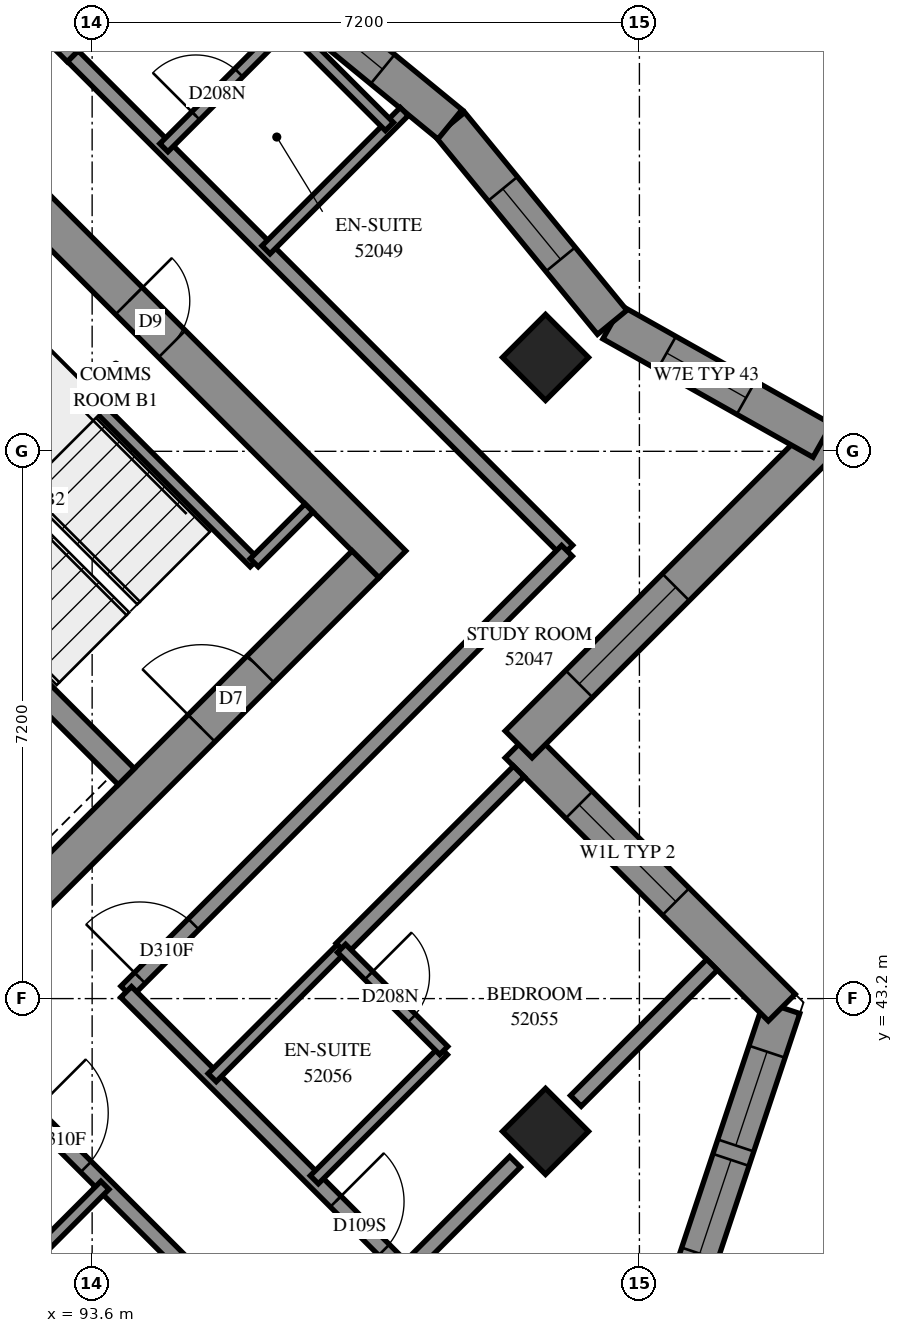
"""IFC4 building model, lengths in metres.
Left out: names, types, materials, properties, quantities, classifications, styles, units other than length and angle.
Written with IfcOpenShell. Run it as: python <this file> out.ifc"""

import sys

from ifc_helpers import new_model, si_unit, direction, frame, frame_2d, origin, origin_2d, place, context, subcontext, project, spatial, polyline, rectangle, outline, extrude, element, fill, save


model = new_model("IFC4")
c1 = context("Model", 3, precision=1e-05, world=origin(), true_north=direction((0.0, 1.0)))
c2 = subcontext(c1, "Body", "Model", "MODEL_VIEW")
j1 = project(units=[si_unit("LENGTHUNIT", "METRE"), si_unit("PLANEANGLEUNIT", "RADIAN")], contexts=[c1])
p1 = place(None, origin())
s1 = spatial("IfcSite", under=j1, at=p1, CompositionType="ELEMENT")
p2 = place(p1, origin())
s2 = spatial("IfcBuilding", under=s1, at=p2, CompositionType="ELEMENT")
p3 = place(p2, frame((0.0, 0.0, 193.0)))
s3 = spatial("IfcBuildingStorey", under=s2, at=p3, CompositionType="ELEMENT", Elevation=193.0)
for number, where, z_axis, x_axis in (
    (1, (99.565, 51.635, 0.0), (0.0, 0.0, 1.0), (0.707, -0.707, 0.0)),
    (2, (99.565, 41.453, 0.0), (0.0, 0.0, 1.0), (0.707, -0.707, 0.0)),
):
    element("IfcColumn", number, at=place(p3, frame(where, z_axis=z_axis, x_axis=x_axis)), inside=s3, PredefinedType="COLUMN", context=c2, shape_type="SweptSolid", body=[
        extrude(rectangle(XDim=0.8, YDim=0.8, at=origin_2d()), origin(), (0.0, 0.0, 1.0), 3.1),
    ])
p4 = place(p3, frame((86.66, 59.802, -0.3), z_axis=(0.0, 0.0, 1.0), x_axis=(0.7071067812, -0.7071067812, 0.0)))
e3 = element("IfcWall", 3, at=p4, inside=s3, PredefinedType="SHEAR", context=c2, shape_type="SweptSolid", body=[
    extrude(rectangle(XDim=15.4, YDim=0.5, at=frame_2d((7.7, 0.0))), origin(), (0.0, 0.0, 1.0), 2.7),
])
p5 = place(p4, frame((10.5, 0.0, 0.3)))
e4 = element("IfcOpeningElement", 4, at=p5, cuts=e3, PredefinedType="OPENING", context=c2, shape_type="SweptSolid", body=[
    extrude(rectangle(XDim=0.8, YDim=2.1, at=frame_2d((0.4, 1.05))), frame((0.0, 0.26, 0.0), z_axis=(0.0, -1.0, 0.0), x_axis=(1.0, 0.0, 0.0)), (0.0, 0.0, 1.0), 0.52),
])
p6 = place(p3, frame((87.013, 38.731, -0.3), z_axis=(0.0, 0.0, 1.0), x_axis=(0.7071067812, 0.7071067812, 0.0)))
e5 = element("IfcWall", 5, at=p6, inside=s3, PredefinedType="SHEAR", context=c2, shape_type="SweptSolid", body=[
    extrude(rectangle(XDim=14.4, YDim=0.5, at=frame_2d((7.2, 0.0))), origin(), (0.0, 0.0, 1.0), 2.7),
])
p7 = place(p6, frame((4.55, 0.0, 0.3)))
e6 = element("IfcOpeningElement", 6, at=p7, cuts=e5, PredefinedType="OPENING", context=c2, shape_type="SweptSolid", body=[
    extrude(rectangle(XDim=1.1, YDim=2.1, at=frame_2d((0.55, 1.05))), frame((0.0, 0.26, 0.0), z_axis=(0.0, -1.0, 0.0), x_axis=(1.0, 0.0, 0.0)), (0.0, 0.0, 1.0), 0.52),
])
p8 = place(p6, frame((11.35, 0.0, 0.3)))
e7 = element("IfcOpeningElement", 7, at=p8, cuts=e5, PredefinedType="OPENING", context=c2, shape_type="SweptSolid", body=[
    extrude(rectangle(XDim=1.1, YDim=2.1, at=frame_2d((0.55, 1.05))), frame((0.0, 0.26, 0.0), z_axis=(0.0, -1.0, 0.0), x_axis=(1.0, 0.0, 0.0)), (0.0, 0.0, 1.0), 0.52),
])
p9 = place(p3, frame((88.958, 51.211, 0.0), z_axis=(0.0, 0.0, 1.0), x_axis=(0.7070998367, -0.7071137256, 0.0)))
e8 = element("IfcWall", 8, at=p9, inside=s3, PredefinedType="SOLIDWALL", context=c2, shape_type="SweptSolid", body=[
    extrude(rectangle(XDim=7.2, YDim=0.3, at=frame_2d((3.6, 0.0))), origin(), (0.0, 0.0, 1.0), 3.1),
])
p10 = place(p3, frame((101.062, 38.252, 0.0), z_axis=(0.0, 0.0, 1.0), x_axis=(0.3162395484, 0.9486793705, 0.0)))
e9 = element("IfcWall", 9, at=p10, inside=s3, PredefinedType="SOLIDWALL", context=c2, shape_type="SweptSolid", body=[
    extrude(outline(polyline([(-0.12, -0.25), (5.247, -0.25), (4.938, 0.25), (0.12, 0.25), (-0.12, -0.25)])), origin(), (0.0, 0.0, 1.0), 3.1),
])
p11 = place(p10, frame((1.68, 0.0, 0.45)))
e10 = element("IfcOpeningElement", 10, at=p11, cuts=e9, PredefinedType="OPENING", context=c2, shape_type="SweptSolid", body=[
    extrude(rectangle(XDim=1.3, YDim=2.5, at=frame_2d((0.65, 1.25))), frame((0.0, 0.26, 0.0), z_axis=(0.0, -1.0, 0.0), x_axis=(1.0, 0.0, 0.0)), (0.0, 0.0, 1.0), 0.52),
])
p12 = place(p10, frame((3.18, 0.0, 0.45)))
e11 = element("IfcOpeningElement", 11, at=p12, cuts=e9, PredefinedType="OPENING", context=c2, shape_type="SweptSolid", body=[
    extrude(rectangle(XDim=1.3, YDim=2.5, at=frame_2d((0.65, 1.25))), frame((0.0, 0.26, 0.0), z_axis=(0.0, -1.0, 0.0), x_axis=(1.0, 0.0, 0.0)), (0.0, 0.0, 1.0), 0.52),
])
p13 = place(p3, frame((102.673, 43.083, 0.0), z_axis=(0.0, 0.0, 1.0), x_axis=(-0.7071067812, 0.7071067812, 0.0)))
e12 = element("IfcWall", 12, at=p13, inside=s3, PredefinedType="SOLIDWALL", context=c2, shape_type="SweptSolid", body=[
    extrude(outline(polyline([(-0.154, -0.25), (4.646, -0.25), (5.146, 0.25), (0.154, 0.25), (-0.154, -0.25)])), origin(), (0.0, 0.0, 1.0), 3.1),
])
p14 = place(p13, frame((1.97, 0.0, 0.6)))
e13 = element("IfcOpeningElement", 13, at=p14, cuts=e12, PredefinedType="OPENING", context=c2, shape_type="SweptSolid", body=[
    extrude(rectangle(XDim=1.8, YDim=1.9, at=frame_2d((0.9, 0.95))), frame((0.0, 0.26, 0.0), z_axis=(0.0, -1.0, 0.0), x_axis=(1.0, 0.0, 0.0)), (0.0, 0.0, 1.0), 0.52),
])
p15 = place(p3, frame((99.211, 46.544, 0.0), z_axis=(0.0, 0.0, 1.0), x_axis=(0.7071156298, 0.7070979325, 0.0)))
e14 = element("IfcWall", 14, at=p15, inside=s3, PredefinedType="SOLIDWALL", context=c2, shape_type="SweptSolid", body=[
    extrude(outline(polyline([(0.25, -0.25), (5.98, -0.25), (5.321, 0.25), (-0.25, 0.25), (0.25, -0.25)])), origin(), (0.0, 0.0, 1.0), 3.1),
])
p16 = place(p15, frame((1.125, 0.0, 0.6)))
e15 = element("IfcOpeningElement", 15, at=p16, cuts=e14, PredefinedType="OPENING", context=c2, shape_type="SweptSolid", body=[
    extrude(rectangle(XDim=1.8, YDim=1.9, at=frame_2d((0.9, 0.95))), frame((0.0, 0.26, 0.0), z_axis=(0.0, -1.0, 0.0), x_axis=(1.0, 0.0, 0.0)), (0.0, 0.0, 1.0), 0.52),
])
p17 = place(p3, frame((103.207, 50.54, 0.0), z_axis=(0.0, 0.0, 1.0), x_axis=(-0.8713136741, 0.4907264832, 0.0)))
e16 = element("IfcWall", 16, at=p17, inside=s3, PredefinedType="SOLIDWALL", context=c2, shape_type="SweptSolid", body=[
    extrude(outline(polyline([(-0.329, -0.25), (3.126, -0.25), (3.22, 0.25), (0.329, 0.25), (-0.329, -0.25)])), origin(), (0.0, 0.0, 1.0), 3.1),
])
p18 = place(p17, frame((1.151, 0.0, 0.45)))
e17 = element("IfcOpeningElement", 17, at=p18, cuts=e16, PredefinedType="OPENING", context=c2, shape_type="SweptSolid", body=[
    extrude(rectangle(XDim=1.2, YDim=2.5, at=frame_2d((0.6, 1.25))), frame((0.0, 0.26, 0.0), z_axis=(0.0, -1.0, 0.0), x_axis=(1.0, 0.0, 0.0)), (0.0, 0.0, 1.0), 0.52),
])
p19 = place(p3, frame((100.442, 52.097, 0.0), z_axis=(0.0, 0.0, 1.0), x_axis=(-0.6338845577, 0.7734276744, 0.0)))
e18 = element("IfcWall", 18, at=p19, inside=s3, PredefinedType="SOLIDWALL", context=c2, shape_type="SweptSolid", body=[
    extrude(outline(polyline([(0.047, -0.25), (3.392, -0.25), (3.342, 0.25), (-0.047, 0.25), (0.047, -0.25)])), origin(), (0.0, 0.0, 1.0), 3.1),
])
p20 = place(p19, frame((1.071, 0.0, 0.45)))
e19 = element("IfcOpeningElement", 19, at=p20, cuts=e18, PredefinedType="OPENING", context=c2, shape_type="SweptSolid", body=[
    extrude(rectangle(XDim=1.2, YDim=2.5, at=frame_2d((0.6, 1.25))), frame((0.0, 0.26, 0.0), z_axis=(0.0, -1.0, 0.0), x_axis=(1.0, 0.0, 0.0)), (0.0, 0.0, 1.0), 0.52),
])
p21 = place(p3, frame((98.308, 54.701, 0.0), z_axis=(0.0, 0.0, 1.0), x_axis=(-0.7734255065, 0.6338872028, 0.0)))
e20 = element("IfcWall", 20, at=p21, inside=s3, PredefinedType="SOLIDWALL", context=c2, shape_type="SweptSolid", body=[
    extrude(outline(polyline([(-0.025, -0.25), (3.32, -0.25), (3.369, 0.25), (0.025, 0.25), (-0.025, -0.25)])), origin(), (0.0, 0.0, 1.0), 3.1),
])
p22 = place(p21, frame((1.145, 0.0, 0.45)))
e21 = element("IfcOpeningElement", 21, at=p22, cuts=e20, PredefinedType="OPENING", context=c2, shape_type="SweptSolid", body=[
    extrude(rectangle(XDim=1.2, YDim=2.5, at=frame_2d((0.6, 1.25))), frame((0.0, 0.26, 0.0), z_axis=(0.0, -1.0, 0.0), x_axis=(1.0, 0.0, 0.0)), (0.0, 0.0, 1.0), 0.52),
])
p23 = place(p3, frame((91.313, 53.354, 0.0), z_axis=(0.0, 0.0, 1.0), x_axis=(0.7071147811, -0.7070987812, 0.0)))
e22 = element("IfcWall", 22, at=p23, inside=s3, PredefinedType="PARTITIONING", context=c2, shape_type="SweptSolid", body=[
    extrude(rectangle(XDim=6.25, YDim=0.15, at=frame_2d((3.125, 0.0))), origin(), (0.0, 0.0, 1.0), 3.1),
])
p24 = place(p3, frame((95.732, 48.934, 0.0), z_axis=(0.0, 0.0, 1.0), x_axis=(0.7071067812, 0.7071067812, 0.0)))
e23 = element("IfcWall", 23, at=p24, inside=s3, PredefinedType="PARTITIONING", context=c2, shape_type="SweptSolid", body=[
    extrude(rectangle(XDim=1.02, YDim=0.15, at=frame_2d((0.51, 0.0))), origin(), (0.0, 0.0, 1.0), 3.1),
])
p25 = place(p3, frame((93.346, 55.599, 0.0), z_axis=(0.0, 0.0, 1.0), x_axis=(0.7071067812, -0.7071067812, 0.0)))
e24 = element("IfcWall", 24, at=p25, inside=s3, PredefinedType="PARTITIONING", context=c2, shape_type="SweptSolid", body=[
    extrude(rectangle(XDim=9.201, YDim=0.2, at=frame_2d((4.601, 0.0))), origin(), (0.0, 0.0, 1.0), 3.1),
])
p26 = place(p3, frame((94.049, 43.293, 0.0), z_axis=(0.0, 0.0, 1.0), x_axis=(0.7071067812, 0.7071067812, 0.0)))
e25 = element("IfcWall", 25, at=p26, inside=s3, PredefinedType="PARTITIONING", context=c2, shape_type="SweptSolid", body=[
    extrude(rectangle(XDim=8.2, YDim=0.2, at=frame_2d((4.1, 0.0))), origin(), (0.0, 0.0, 1.0), 3.1),
])
p27 = place(p26, frame((0.252, 0.0, 0.0)))
e26 = element("IfcOpeningElement", 26, at=p27, cuts=e25, PredefinedType="OPENING", context=c2, shape_type="SweptSolid", body=[
    extrude(rectangle(XDim=1.0, YDim=2.1, at=frame_2d((0.5, 1.05))), frame((0.0, 0.11, 0.0), z_axis=(0.0, -1.0, 0.0), x_axis=(1.0, 0.0, 0.0)), (0.0, 0.0, 1.0), 0.22),
])
p28 = place(p3, frame((94.047, 43.287, 0.0), z_axis=(0.0, 0.0, 1.0), x_axis=(0.7071067812, -0.7071067812, 0.0)))
e27 = element("IfcWall", 27, at=p28, inside=s3, PredefinedType="PARTITIONING", context=c2, shape_type="SweptSolid", body=[
    extrude(rectangle(XDim=5.199, YDim=0.2, at=frame_2d((2.599, 0.0))), origin(), (0.0, 0.0, 1.0), 3.1),
])
p29 = place(p28, frame((3.898, 0.0, 0.0)))
e28 = element("IfcOpeningElement", 28, at=p29, cuts=e27, PredefinedType="OPENING", context=c2, shape_type="SweptSolid", body=[
    extrude(rectangle(XDim=0.9, YDim=2.1, at=frame_2d((0.45, 1.05))), frame((0.0, 0.11, 0.0), z_axis=(0.0, -1.0, 0.0), x_axis=(1.0, 0.0, 0.0)), (0.0, 0.0, 1.0), 0.22),
])
p30 = place(p3, frame((92.633, 41.873, 0.0), z_axis=(0.0, 0.0, 1.0), x_axis=(0.7071067812, -0.7071067812, 0.0)))
e29 = element("IfcWall", 29, at=p30, inside=s3, PredefinedType="PARTITIONING", context=c2, shape_type="SweptSolid", body=[
    extrude(rectangle(XDim=5.199, YDim=0.2, at=frame_2d((2.599, 0.0))), origin(), (0.0, 0.0, 1.0), 3.1),
])
p31 = place(p30, frame((0.253, 0.0, 0.0)))
e30 = element("IfcOpeningElement", 30, at=p31, cuts=e29, PredefinedType="OPENING", context=c2, shape_type="SweptSolid", body=[
    extrude(rectangle(XDim=1.0, YDim=2.1, at=frame_2d((0.5, 1.05))), frame((0.0, 0.11, 0.0), z_axis=(0.0, -1.0, 0.0), x_axis=(1.0, 0.0, 0.0)), (0.0, 0.0, 1.0), 0.22),
])
p32 = place(p30, frame((3.948, 0.0, 0.0)))
e31 = element("IfcOpeningElement", 31, at=p32, cuts=e29, PredefinedType="OPENING", context=c2, shape_type="SweptSolid", body=[
    extrude(rectangle(XDim=0.9, YDim=2.1, at=frame_2d((0.45, 1.05))), frame((0.0, 0.11, 0.0), z_axis=(0.0, -1.0, 0.0), x_axis=(1.0, 0.0, 0.0)), (0.0, 0.0, 1.0), 0.22),
])
p33 = place(p3, frame((96.88, 43.856, 0.0), z_axis=(0.0, 0.0, 1.0), x_axis=(0.7074098182, 0.7068036142, 0.0)))
e32 = element("IfcWall", 32, at=p33, inside=s3, PredefinedType="PARTITIONING", context=c2, shape_type="SweptSolid", body=[
    extrude(rectangle(XDim=3.299, YDim=0.2, at=frame_2d((1.65, 0.0))), origin(), (0.0, 0.0, 1.0), 3.1),
])
p34 = place(p3, frame((95.887, 53.051, 0.0), z_axis=(0.0, 0.0, 1.0), x_axis=(0.707087349, 0.7071262128, 0.0)))
e33 = element("IfcWall", 33, at=p34, inside=s3, PredefinedType="PARTITIONING", context=c2, shape_type="SweptSolid", body=[
    extrude(rectangle(XDim=2.573, YDim=0.15, at=frame_2d((1.287, 0.0))), origin(), (0.0, 0.0, 1.0), 3.1),
])
p35 = place(p3, frame((99.964, 41.854, 0.0), z_axis=(0.0, 0.0, 1.0), x_axis=(0.7071265121, 0.7070870497, 0.0)))
e34 = element("IfcWall", 34, at=p35, inside=s3, PredefinedType="PARTITIONING", context=c2, shape_type="SweptSolid", body=[
    extrude(rectangle(XDim=2.534, YDim=0.2, at=frame_2d((1.267, 0.0))), origin(), (0.0, 0.0, 1.0), 3.1),
])
for number, where, z_axis, x_axis in (
    (35, (96.523, 40.817, 0.0), (0.0, 0.0, 1.0), (0.707, 0.707, 0.0)),
    (36, (95.179, 42.161, 0.0), (0.0, 0.0, 1.0), (0.707, 0.707, 0.0)),
):
    element("IfcWall", number, at=place(p3, frame(where, z_axis=z_axis, x_axis=x_axis)), inside=s3, PredefinedType="PARTITIONING", context=c2, shape_type="SweptSolid", body=[
        extrude(rectangle(XDim=2.401, YDim=0.15, at=frame_2d((1.201, 0.0))), origin(), (0.0, 0.0, 1.0), 3.1),
    ])
p36 = place(p3, frame((92.072, 39.046, 0.0), z_axis=(0.0, 0.0, 1.0), x_axis=(0.706689978, 0.7075233388, 0.0)))
e37 = element("IfcWall", 37, at=p36, inside=s3, PredefinedType="PARTITIONING", context=c2, shape_type="SweptSolid", body=[
    extrude(rectangle(XDim=2.4, YDim=0.15, at=frame_2d((1.2, 0.0))), origin(), (0.0, 0.0, 1.0), 3.1),
])
p37 = place(p3, frame((94.544, 54.394, 0.0), z_axis=(0.0, 0.0, 1.0), x_axis=(0.7071067812, 0.7071067812, 0.0)))
e38 = element("IfcWall", 38, at=p37, inside=s3, PredefinedType="PARTITIONING", context=c2, shape_type="SweptSolid", body=[
    extrude(rectangle(XDim=2.385, YDim=0.15, at=frame_2d((1.192, 0.0))), origin(), (0.0, 0.0, 1.0), 3.1),
])
p38 = place(p37, frame((0.594, 0.0, 0.0)))
e39 = element("IfcOpeningElement", 39, at=p38, cuts=e38, PredefinedType="OPENING", context=c2, shape_type="SweptSolid", body=[
    extrude(rectangle(XDim=0.8, YDim=2.1, at=frame_2d((0.4, 1.05))), frame((0.0, 0.085, 0.0), z_axis=(0.0, -1.0, 0.0), x_axis=(1.0, 0.0, 0.0)), (0.0, 0.0, 1.0), 0.17),
])
p39 = place(p3, frame((97.727, 39.613, 0.0), z_axis=(0.0, 0.0, 1.0), x_axis=(0.7066152229, 0.7075979979, 0.0)))
e40 = element("IfcWall", 40, at=p39, inside=s3, PredefinedType="PARTITIONING", context=c2, shape_type="SweptSolid", body=[
    extrude(rectangle(XDim=2.035, YDim=0.2, at=frame_2d((1.018, 0.0))), origin(), (0.0, 0.0, 1.0), 2.6),
])
p40 = place(p3, frame((96.167, 56.017, 0.0), z_axis=(0.0, 0.0, 1.0), x_axis=(0.7071067812, -0.7071067812, 0.0)))
e41 = element("IfcWall", 41, at=p40, inside=s3, PredefinedType="PARTITIONING", context=c2, shape_type="SweptSolid", body=[
    extrude(rectangle(XDim=1.901, YDim=0.15, at=frame_2d((0.95, 0.0))), origin(), (0.0, 0.0, 1.0), 3.1),
])
p41 = place(p3, frame((96.881, 43.861, 0.0), z_axis=(0.0, 0.0, 1.0), x_axis=(0.7071067812, -0.7071067812, 0.0)))
e42 = element("IfcWall", 42, at=p41, inside=s3, PredefinedType="PARTITIONING", context=c2, shape_type="SweptSolid", body=[
    extrude(rectangle(XDim=1.901, YDim=0.15, at=frame_2d((0.95, 0.0))), origin(), (0.0, 0.0, 1.0), 3.1),
])
p42 = place(p41, frame((0.505, 0.0, 0.0)))
e43 = element("IfcOpeningElement", 43, at=p42, cuts=e42, PredefinedType="OPENING", context=c2, shape_type="SweptSolid", body=[
    extrude(rectangle(XDim=0.8, YDim=2.1, at=frame_2d((0.4, 1.05))), frame((0.0, 0.085, 0.0), z_axis=(0.0, -1.0, 0.0), x_axis=(1.0, 0.0, 0.0)), (0.0, 0.0, 1.0), 0.17),
])
p43 = place(p3, frame((92.311, 56.627, 0.0), z_axis=(0.0, 0.0, 1.0), x_axis=(0.7077922938, -0.7064206033, 0.0)))
e44 = element("IfcWall", 44, at=p43, inside=s3, PredefinedType="PARTITIONING", context=c2, shape_type="SweptSolid", body=[
    extrude(rectangle(XDim=1.458, YDim=0.2, at=frame_2d((0.729, 0.0))), origin(), (0.0, 0.0, 1.0), 3.1),
])
p44 = place(p11, origin())
e45 = element("IfcWindow", 45, at=p44, inside=s3, PartitioningType="SINGLE_PANEL", PredefinedType="WINDOW", context=c2, shape_type="SweptSolid", body=[
    extrude(rectangle(XDim=1.3, YDim=2.5, at=frame_2d((0.65, 1.25))), frame((0.0, 0.18, 0.0), z_axis=(0.0, -1.0, 0.0), x_axis=(1.0, 0.0, 0.0)), (0.0, 0.0, 1.0), 0.06),
])
fill(e10, e45)
p45 = place(p12, origin())
e46 = element("IfcWindow", 46, at=p45, inside=s3, PartitioningType="SINGLE_PANEL", PredefinedType="WINDOW", context=c2, shape_type="SweptSolid", body=[
    extrude(rectangle(XDim=1.3, YDim=2.5, at=frame_2d((0.65, 1.25))), frame((0.0, 0.18, 0.0), z_axis=(0.0, -1.0, 0.0), x_axis=(1.0, 0.0, 0.0)), (0.0, 0.0, 1.0), 0.06),
])
fill(e11, e46)
p46 = place(p14, origin())
e47 = element("IfcWindow", 47, at=p46, inside=s3, PartitioningType="SINGLE_PANEL", PredefinedType="WINDOW", context=c2, shape_type="SweptSolid", body=[
    extrude(rectangle(XDim=1.8, YDim=1.9, at=frame_2d((0.9, 0.95))), frame((0.0, 0.18, 0.0), z_axis=(0.0, -1.0, 0.0), x_axis=(1.0, 0.0, 0.0)), (0.0, 0.0, 1.0), 0.06),
])
fill(e13, e47)
p47 = place(p16, origin())
e48 = element("IfcWindow", 48, at=p47, inside=s3, PartitioningType="SINGLE_PANEL", PredefinedType="WINDOW", context=c2, shape_type="SweptSolid", body=[
    extrude(rectangle(XDim=1.8, YDim=1.9, at=frame_2d((0.9, 0.95))), frame((0.0, 0.18, 0.0), z_axis=(0.0, -1.0, 0.0), x_axis=(1.0, 0.0, 0.0)), (0.0, 0.0, 1.0), 0.06),
])
fill(e15, e48)
p48 = place(p18, origin())
e49 = element("IfcWindow", 49, at=p48, inside=s3, PartitioningType="SINGLE_PANEL", PredefinedType="WINDOW", context=c2, shape_type="SweptSolid", body=[
    extrude(rectangle(XDim=1.2, YDim=2.5, at=frame_2d((0.6, 1.25))), frame((0.0, 0.18, 0.0), z_axis=(0.0, -1.0, 0.0), x_axis=(1.0, 0.0, 0.0)), (0.0, 0.0, 1.0), 0.06),
])
fill(e17, e49)
p49 = place(p20, origin())
e50 = element("IfcWindow", 50, at=p49, inside=s3, PartitioningType="SINGLE_PANEL", PredefinedType="WINDOW", context=c2, shape_type="SweptSolid", body=[
    extrude(rectangle(XDim=1.2, YDim=2.5, at=frame_2d((0.6, 1.25))), frame((0.0, 0.18, 0.0), z_axis=(0.0, -1.0, 0.0), x_axis=(1.0, 0.0, 0.0)), (0.0, 0.0, 1.0), 0.06),
])
fill(e19, e50)
p50 = place(p22, origin())
e51 = element("IfcWindow", 51, at=p50, inside=s3, PartitioningType="SINGLE_PANEL", PredefinedType="WINDOW", context=c2, shape_type="SweptSolid", body=[
    extrude(rectangle(XDim=1.2, YDim=2.5, at=frame_2d((0.6, 1.25))), frame((0.0, 0.18, 0.0), z_axis=(0.0, -1.0, 0.0), x_axis=(1.0, 0.0, 0.0)), (0.0, 0.0, 1.0), 0.06),
])
fill(e21, e51)
p51 = place(p5, origin())
e52 = element("IfcDoor", 52, at=p51, inside=s3, OperationType="SINGLE_SWING_RIGHT", PredefinedType="DOOR", context=c2, shape_type="SweptSolid", body=[
    extrude(rectangle(XDim=0.8, YDim=2.1, at=frame_2d((0.4, 1.05))), frame((0.0, 0.025, 0.0), z_axis=(0.0, -1.0, 0.0), x_axis=(1.0, 0.0, 0.0)), (0.0, 0.0, 1.0), 0.05),
])
fill(e4, e52)
p52 = place(p8, origin())
e53 = element("IfcDoor", 53, at=p52, inside=s3, OperationType="SINGLE_SWING_RIGHT", PredefinedType="DOOR", context=c2, shape_type="SweptSolid", body=[
    extrude(rectangle(XDim=1.1, YDim=2.1, at=frame_2d((0.55, 1.05))), frame((0.0, 0.025, 0.0), z_axis=(0.0, -1.0, 0.0), x_axis=(1.0, 0.0, 0.0)), (0.0, 0.0, 1.0), 0.05),
])
fill(e7, e53)
p53 = place(p27, origin())
e54 = element("IfcDoor", 54, at=p53, inside=s3, OperationType="SINGLE_SWING_RIGHT", PredefinedType="DOOR", context=c2, shape_type="SweptSolid", body=[
    extrude(rectangle(XDim=1.0, YDim=2.1, at=frame_2d((0.5, 1.05))), frame((0.0, 0.025, 0.0), z_axis=(0.0, -1.0, 0.0), x_axis=(1.0, 0.0, 0.0)), (0.0, 0.0, 1.0), 0.05),
])
fill(e26, e54)
p54 = place(p38, origin())
e55 = element("IfcDoor", 55, at=p54, inside=s3, OperationType="SINGLE_SWING_RIGHT", PredefinedType="DOOR", context=c2, shape_type="SweptSolid", body=[
    extrude(rectangle(XDim=0.8, YDim=2.1, at=frame_2d((0.4, 1.05))), frame((0.0, 0.025, 0.0), z_axis=(0.0, -1.0, 0.0), x_axis=(1.0, 0.0, 0.0)), (0.0, 0.0, 1.0), 0.05),
])
fill(e39, e55)
p55 = place(p31, origin())
e56 = element("IfcDoor", 56, at=p55, inside=s3, OperationType="SINGLE_SWING_RIGHT", PredefinedType="DOOR", context=c2, shape_type="SweptSolid", body=[
    extrude(rectangle(XDim=1.0, YDim=2.1, at=frame_2d((0.5, 1.05))), frame((0.0, 0.025, 0.0), z_axis=(0.0, -1.0, 0.0), x_axis=(1.0, 0.0, 0.0)), (0.0, 0.0, 1.0), 0.05),
])
fill(e30, e56)
p56 = place(p29, origin())
e57 = element("IfcDoor", 57, at=p56, inside=s3, OperationType="SINGLE_SWING_RIGHT", PredefinedType="DOOR", context=c2, shape_type="SweptSolid", body=[
    extrude(rectangle(XDim=0.9, YDim=2.1, at=frame_2d((0.45, 1.05))), frame((0.0, 0.025, 0.0), z_axis=(0.0, -1.0, 0.0), x_axis=(1.0, 0.0, 0.0)), (0.0, 0.0, 1.0), 0.05),
])
fill(e28, e57)
p57 = place(p42, origin())
e58 = element("IfcDoor", 58, at=p57, inside=s3, OperationType="SINGLE_SWING_RIGHT", PredefinedType="DOOR", context=c2, shape_type="SweptSolid", body=[
    extrude(rectangle(XDim=0.8, YDim=2.1, at=frame_2d((0.4, 1.05))), frame((0.0, 0.025, 0.0), z_axis=(0.0, -1.0, 0.0), x_axis=(1.0, 0.0, 0.0)), (0.0, 0.0, 1.0), 0.05),
])
fill(e43, e58)
save(model, sys.argv[1])
